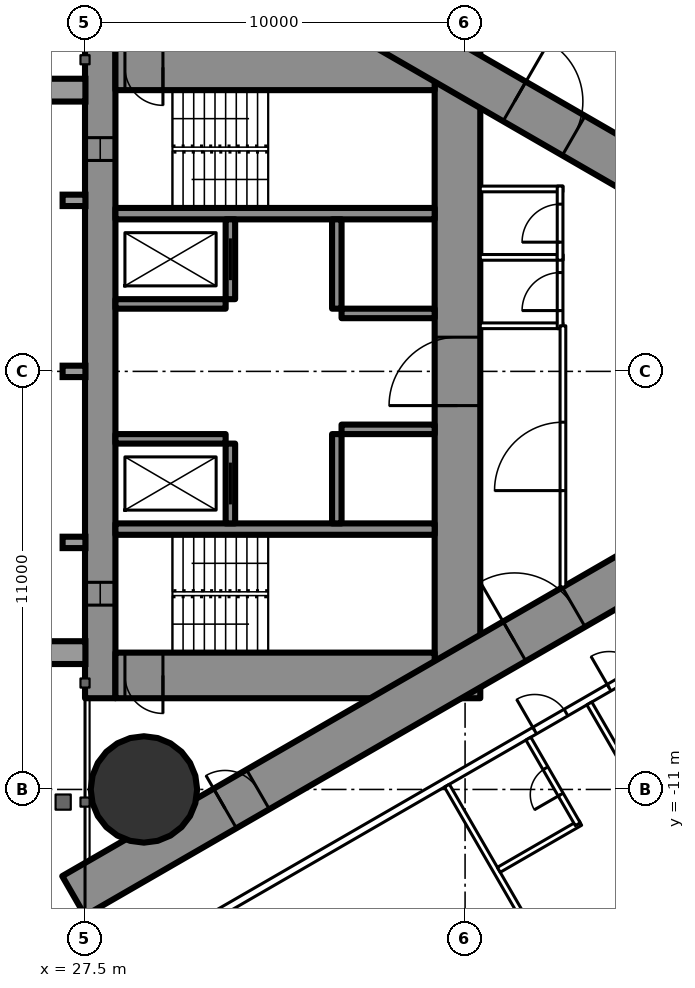
"""IFC4 building model, lengths in metres.
Left out: names, types, materials, properties, quantities, classifications, styles, units other than length and angle.
Written with IfcOpenShell. Run it as: python <this file> out.ifc"""

import sys

from ifc_helpers import new_model, si_unit, direction, frame, frame_2d, origin, origin_2d, place, context, subcontext, project, spatial, rectangle, circle, extrude, element, fill, save


model = new_model("IFC4")
c1 = context("Model", 3, precision=1e-05, world=origin(), true_north=direction((0.0, 1.0)))
c2 = subcontext(c1, "Body", "Model", "MODEL_VIEW")
j1 = project(units=[si_unit("LENGTHUNIT", "METRE"), si_unit("PLANEANGLEUNIT", "RADIAN")], contexts=[c1])
p1 = place(None, origin())
s1 = spatial("IfcSite", under=j1, at=p1, CompositionType="ELEMENT")
p2 = place(p1, origin())
s2 = spatial("IfcBuilding", under=s1, at=p2, CompositionType="ELEMENT")
p3 = place(p2, frame((0.0, 0.0, 191.3)))
s3 = spatial("IfcBuildingStorey", under=s2, at=p3, CompositionType="ELEMENT", Elevation=191.3)
p4 = place(p3, frame((29.05, -11.0, 0.0), z_axis=(0.0, 0.0, 1.0), x_axis=(1.0, 0.0, 0.0)))
e1 = element("IfcColumn", 1, at=p4, inside=s3, PredefinedType="COLUMN", context=c2, shape_type="SweptSolid", body=[
    extrude(circle(Radius=1.4, at=origin_2d()), origin(), (0.0, 0.0, 1.0), 3.5),
])
p5 = place(p3, frame((27.9, -8.6, 0.0), z_axis=(0.0, 0.0, 1.0), x_axis=(0.0, 1.0, 0.0)))
e2 = element("IfcWall", 2, at=p5, inside=s3, PredefinedType="SHEAR", context=c2, shape_type="SweptSolid", body=[
    extrude(rectangle(XDim=17.2, YDim=0.8, at=frame_2d((8.6, 0.0))), origin(), (0.0, 0.0, 1.0), 3.5),
])
p6 = place(p5, frame((2.45, 0.0, 0.6)))
e3 = element("IfcOpeningElement", 3, at=p6, cuts=e2, PredefinedType="OPENING", context=c2, shape_type="SweptSolid", body=[
    extrude(rectangle(XDim=0.6, YDim=2.1, at=frame_2d((0.3, 1.05))), frame((0.0, 0.41, 0.0), z_axis=(0.0, -1.0, 0.0), x_axis=(1.0, 0.0, 0.0)), (0.0, 0.0, 1.0), 0.82),
])
p7 = place(p5, frame((14.15, 0.0, 0.6)))
e4 = element("IfcOpeningElement", 4, at=p7, cuts=e2, PredefinedType="OPENING", context=c2, shape_type="SweptSolid", body=[
    extrude(rectangle(XDim=0.6, YDim=2.1, at=frame_2d((0.3, 1.05))), frame((0.0, 0.41, 0.0), z_axis=(0.0, -1.0, 0.0), x_axis=(1.0, 0.0, 0.0)), (0.0, 0.0, 1.0), 0.82),
])
p8 = place(p3, frame((37.3, -8.6, 0.0), z_axis=(0.0, 0.0, 1.0), x_axis=(0.0, 1.0, 0.0)))
e5 = element("IfcWall", 5, at=p8, inside=s3, PredefinedType="SHEAR", context=c2, shape_type="SweptSolid", body=[
    extrude(rectangle(XDim=17.2, YDim=1.2, at=frame_2d((8.6, 0.0))), origin(), (0.0, 0.0, 1.0), 3.5),
])
p9 = place(p8, frame((7.7, 0.0, 0.0)))
e6 = element("IfcOpeningElement", 6, at=p9, cuts=e5, PredefinedType="OPENING", context=c2, shape_type="SweptSolid", body=[
    extrude(rectangle(XDim=1.8, YDim=2.2, at=frame_2d((0.9, 1.1))), frame((0.0, 0.61, 0.0), z_axis=(0.0, -1.0, 0.0), x_axis=(1.0, 0.0, 0.0)), (0.0, 0.0, 1.0), 1.22),
])
p10 = place(p3, frame((28.3, -8.0, 0.0), z_axis=(0.0, 0.0, 1.0), x_axis=(1.0, 0.0, 0.0)))
e7 = element("IfcWall", 7, at=p10, inside=s3, PredefinedType="SHEAR", context=c2, shape_type="SweptSolid", body=[
    extrude(rectangle(XDim=8.4, YDim=1.2, at=frame_2d((4.2, 0.0))), origin(), (0.0, 0.0, 1.0), 3.5),
])
p11 = place(p10, frame((0.25, 0.0, 0.0)))
e8 = element("IfcOpeningElement", 8, at=p11, cuts=e7, PredefinedType="OPENING", context=c2, shape_type="SweptSolid", body=[
    extrude(rectangle(XDim=1.0, YDim=2.2, at=frame_2d((0.5, 1.1))), frame((0.0, 0.61, 0.0), z_axis=(0.0, -1.0, 0.0), x_axis=(1.0, 0.0, 0.0)), (0.0, 0.0, 1.0), 1.22),
])
p12 = place(p3, frame((28.3, 8.0, 0.0), z_axis=(0.0, 0.0, 1.0), x_axis=(1.0, 0.0, 0.0)))
e9 = element("IfcWall", 9, at=p12, inside=s3, PredefinedType="SHEAR", context=c2, shape_type="SweptSolid", body=[
    extrude(rectangle(XDim=8.4, YDim=1.2, at=frame_2d((4.2, 0.0))), origin(), (0.0, 0.0, 1.0), 3.5),
])
p13 = place(p12, frame((0.25, 0.0, 0.0)))
e10 = element("IfcOpeningElement", 10, at=p13, cuts=e9, PredefinedType="OPENING", context=c2, shape_type="SweptSolid", body=[
    extrude(rectangle(XDim=1.0, YDim=2.2, at=frame_2d((0.5, 1.1))), frame((0.0, 0.61, 0.0), z_axis=(0.0, -1.0, 0.0), x_axis=(1.0, 0.0, 0.0)), (0.0, 0.0, 1.0), 1.22),
])
for number, where, z_axis, x_axis in (
    (11, (28.3, -4.15, 0.0), (0.0, 0.0, 1.0), (1.0, 0.0, 0.0)),
    (12, (28.3, 4.15, 0.0), (0.0, 0.0, 1.0), (1.0, 0.0, 0.0)),
):
    element("IfcWall", number, at=place(p3, frame(where, z_axis=z_axis, x_axis=x_axis)), inside=s3, PredefinedType="SHEAR", context=c2, shape_type="SweptSolid", body=[
        extrude(rectangle(XDim=8.4, YDim=0.3, at=frame_2d((4.2, 0.0))), origin(), (0.0, 0.0, 1.0), 3.5),
    ])
p14 = place(p3, frame((31.325, -4.0, 0.0), z_axis=(0.0, 0.0, 1.0), x_axis=(0.0, 1.0, 0.0)))
e13 = element("IfcWall", 13, at=p14, inside=s3, PredefinedType="SHEAR", context=c2, shape_type="SweptSolid", body=[
    extrude(rectangle(XDim=2.1, YDim=0.25, at=frame_2d((1.05, 0.0))), origin(), (0.0, 0.0, 1.0), 3.5),
])
p15 = place(p14, frame((0.5, 0.0, 0.0)))
e14 = element("IfcOpeningElement", 14, at=p15, cuts=e13, PredefinedType="OPENING", context=c2, shape_type="SweptSolid", body=[
    extrude(rectangle(XDim=1.1, YDim=2.2, at=frame_2d((0.55, 1.1))), frame((0.0, 0.135, 0.0), z_axis=(0.0, -1.0, 0.0), x_axis=(1.0, 0.0, 0.0)), (0.0, 0.0, 1.0), 0.27),
])
p16 = place(p3, frame((34.125, -4.0, 0.0), z_axis=(0.0, 0.0, 1.0), x_axis=(0.0, 1.0, 0.0)))
e15 = element("IfcWall", 15, at=p16, inside=s3, PredefinedType="SHEAR", context=c2, shape_type="SweptSolid", body=[
    extrude(rectangle(XDim=2.35, YDim=0.25, at=frame_2d((1.175, 0.0))), origin(), (0.0, 0.0, 1.0), 3.5),
])
p17 = place(p3, frame((28.3, -1.775, 0.0), z_axis=(0.0, 0.0, 1.0), x_axis=(1.0, 0.0, 0.0)))
e16 = element("IfcWall", 16, at=p17, inside=s3, PredefinedType="SHEAR", context=c2, shape_type="SweptSolid", body=[
    extrude(rectangle(XDim=2.9, YDim=0.25, at=frame_2d((1.45, 0.0))), origin(), (0.0, 0.0, 1.0), 3.5),
])
p18 = place(p3, frame((34.25, -1.525, 0.0), z_axis=(0.0, 0.0, 1.0), x_axis=(1.0, 0.0, 0.0)))
e17 = element("IfcWall", 17, at=p18, inside=s3, PredefinedType="SHEAR", context=c2, shape_type="SweptSolid", body=[
    extrude(rectangle(XDim=2.45, YDim=0.25, at=frame_2d((1.225, 0.0))), origin(), (0.0, 0.0, 1.0), 3.5),
])
p19 = place(p3, frame((31.325, 1.9, 0.0), z_axis=(0.0, 0.0, 1.0), x_axis=(0.0, 1.0, 0.0)))
e18 = element("IfcWall", 18, at=p19, inside=s3, PredefinedType="SHEAR", context=c2, shape_type="SweptSolid", body=[
    extrude(rectangle(XDim=2.1, YDim=0.25, at=frame_2d((1.05, 0.0))), origin(), (0.0, 0.0, 1.0), 3.5),
])
p20 = place(p19, frame((0.5, 0.0, 0.0)))
e19 = element("IfcOpeningElement", 19, at=p20, cuts=e18, PredefinedType="OPENING", context=c2, shape_type="SweptSolid", body=[
    extrude(rectangle(XDim=1.1, YDim=2.2, at=frame_2d((0.55, 1.1))), frame((0.0, 0.135, 0.0), z_axis=(0.0, -1.0, 0.0), x_axis=(1.0, 0.0, 0.0)), (0.0, 0.0, 1.0), 0.27),
])
p21 = place(p3, frame((34.125, 1.65, 0.0), z_axis=(0.0, 0.0, 1.0), x_axis=(0.0, 1.0, 0.0)))
e20 = element("IfcWall", 20, at=p21, inside=s3, PredefinedType="SHEAR", context=c2, shape_type="SweptSolid", body=[
    extrude(rectangle(XDim=2.35, YDim=0.25, at=frame_2d((1.175, 0.0))), origin(), (0.0, 0.0, 1.0), 3.5),
])
p22 = place(p3, frame((28.3, 1.775, 0.0), z_axis=(0.0, 0.0, 1.0), x_axis=(1.0, 0.0, 0.0)))
e21 = element("IfcWall", 21, at=p22, inside=s3, PredefinedType="SHEAR", context=c2, shape_type="SweptSolid", body=[
    extrude(rectangle(XDim=2.9, YDim=0.25, at=frame_2d((1.45, 0.0))), origin(), (0.0, 0.0, 1.0), 3.5),
])
p23 = place(p3, frame((34.25, 1.525, 0.0), z_axis=(0.0, 0.0, 1.0), x_axis=(1.0, 0.0, 0.0)))
e22 = element("IfcWall", 22, at=p23, inside=s3, PredefinedType="SHEAR", context=c2, shape_type="SweptSolid", body=[
    extrude(rectangle(XDim=2.45, YDim=0.25, at=frame_2d((1.225, 0.0))), origin(), (0.0, 0.0, 1.0), 3.5),
])
p24 = place(p3, frame((27.2, -13.8, 0.0), z_axis=(0.0, 0.0, 1.0), x_axis=(0.866027159892, 0.499996958321, 0.0)))
e23 = element("IfcWall", 23, at=p24, inside=s3, PredefinedType="SHEAR", context=c2, shape_type="SweptSolid", body=[
    extrude(rectangle(XDim=27.947, YDim=1.2, at=frame_2d((13.973, 0.0))), origin(), (0.0, 0.0, 1.0), 3.5),
])
p25 = place(p24, frame((4.6, 0.0, 0.0)))
e24 = element("IfcOpeningElement", 24, at=p25, cuts=e23, PredefinedType="OPENING", context=c2, shape_type="SweptSolid", body=[
    extrude(rectangle(XDim=1.0, YDim=2.2, at=frame_2d((0.5, 1.1))), frame((0.0, 0.61, 0.0), z_axis=(0.0, -1.0, 0.0), x_axis=(1.0, 0.0, 0.0)), (0.0, 0.0, 1.0), 1.22),
])
p26 = place(p24, frame((13.395, 0.0, 0.0)))
e25 = element("IfcOpeningElement", 25, at=p26, cuts=e23, PredefinedType="OPENING", context=c2, shape_type="SweptSolid", body=[
    extrude(rectangle(XDim=1.8, YDim=2.2, at=frame_2d((0.9, 1.1))), frame((0.0, 0.61, 0.0), z_axis=(0.0, -1.0, 0.0), x_axis=(1.0, 0.0, 0.0)), (0.0, 0.0, 1.0), 1.22),
])
p27 = place(p3, frame((27.2, 13.8, 0.0), z_axis=(0.0, 0.0, 1.0), x_axis=(0.866024515034, -0.500001539357, 0.0)))
e26 = element("IfcWall", 26, at=p27, inside=s3, PredefinedType="SHEAR", context=c2, shape_type="SweptSolid", body=[
    extrude(rectangle(XDim=26.907, YDim=1.2, at=frame_2d((13.454, 0.0))), origin(), (0.0, 0.0, 1.0), 3.5),
])
p28 = place(p27, frame((4.6, 0.0, 0.0)))
e27 = element("IfcOpeningElement", 27, at=p28, cuts=e26, PredefinedType="OPENING", context=c2, shape_type="SweptSolid", body=[
    extrude(rectangle(XDim=1.0, YDim=2.2, at=frame_2d((0.5, 1.1))), frame((0.0, 0.61, 0.0), z_axis=(0.0, -1.0, 0.0), x_axis=(1.0, 0.0, 0.0)), (0.0, 0.0, 1.0), 1.22),
])
p29 = place(p27, frame((13.395, 0.0, 0.0)))
e28 = element("IfcOpeningElement", 28, at=p29, cuts=e26, PredefinedType="OPENING", context=c2, shape_type="SweptSolid", body=[
    extrude(rectangle(XDim=1.8, YDim=2.2, at=frame_2d((0.9, 1.1))), frame((0.0, 0.61, 0.0), z_axis=(0.0, -1.0, 0.0), x_axis=(1.0, 0.0, 0.0)), (0.0, 0.0, 1.0), 1.22),
])
p30 = place(p3, frame((27.959, -16.017, 0.0), z_axis=(0.0, 0.0, 1.0), x_axis=(0.866024151371, 0.500002169237, 0.0)))
e29 = element("IfcWall", 29, at=p30, inside=s3, PredefinedType="PARTITIONING", context=c2, shape_type="SweptSolid", body=[
    extrude(rectangle(XDim=32.034, YDim=0.2, at=frame_2d((16.017, 0.0))), origin(), (0.0, 0.0, 1.0), 3.25),
])
p31 = place(p30, frame((0.6, 0.0, 0.0)))
e30 = element("IfcOpeningElement", 30, at=p31, cuts=e29, PredefinedType="OPENING", context=c2, shape_type="SweptSolid", body=[
    extrude(rectangle(XDim=0.95, YDim=2.2, at=frame_2d((0.475, 1.1))), frame((0.0, 0.11, 0.0), z_axis=(0.0, -1.0, 0.0), x_axis=(1.0, 0.0, 0.0)), (0.0, 0.0, 1.0), 0.22),
])
p32 = place(p30, frame((13.132, 0.0, 0.0)))
e31 = element("IfcOpeningElement", 31, at=p32, cuts=e29, PredefinedType="OPENING", context=c2, shape_type="SweptSolid", body=[
    extrude(rectangle(XDim=0.95, YDim=2.2, at=frame_2d((0.475, 1.1))), frame((0.0, 0.11, 0.0), z_axis=(0.0, -1.0, 0.0), x_axis=(1.0, 0.0, 0.0)), (0.0, 0.0, 1.0), 0.22),
])
p33 = place(p30, frame((15.391, 0.0, 0.0)))
e32 = element("IfcOpeningElement", 32, at=p33, cuts=e29, PredefinedType="OPENING", context=c2, shape_type="SweptSolid", body=[
    extrude(rectangle(XDim=0.95, YDim=2.2, at=frame_2d((0.475, 1.1))), frame((0.0, 0.11, 0.0), z_axis=(0.0, -1.0, 0.0), x_axis=(1.0, 0.0, 0.0)), (0.0, 0.0, 1.0), 0.22),
])
p34 = place(p30, frame((19.441, 0.0, 0.0)))
e33 = element("IfcOpeningElement", 33, at=p34, cuts=e29, PredefinedType="OPENING", context=c2, shape_type="SweptSolid", body=[
    extrude(rectangle(XDim=0.95, YDim=2.2, at=frame_2d((0.475, 1.1))), frame((0.0, 0.11, 0.0), z_axis=(0.0, -1.0, 0.0), x_axis=(1.0, 0.0, 0.0)), (0.0, 0.0, 1.0), 0.22),
])
p35 = place(p30, frame((26.406, 0.0, 0.0)))
e34 = element("IfcOpeningElement", 34, at=p35, cuts=e29, PredefinedType="OPENING", context=c2, shape_type="SweptSolid", body=[
    extrude(rectangle(XDim=0.95, YDim=2.2, at=frame_2d((0.475, 1.1))), frame((0.0, 0.11, 0.0), z_axis=(0.0, -1.0, 0.0), x_axis=(1.0, 0.0, 0.0)), (0.0, 0.0, 1.0), 0.22),
])
p36 = place(p30, frame((28.87, 0.0, 0.0)))
e35 = element("IfcOpeningElement", 35, at=p36, cuts=e29, PredefinedType="OPENING", context=c2, shape_type="SweptSolid", body=[
    extrude(rectangle(XDim=1.8, YDim=2.2, at=frame_2d((0.9, 1.1))), frame((0.0, 0.11, 0.0), z_axis=(0.0, -1.0, 0.0), x_axis=(1.0, 0.0, 0.0)), (0.0, 0.0, 1.0), 0.22),
])
p37 = place(p3, frame((37.022, -10.9, 0.0), z_axis=(0.0, 0.0, 1.0), x_axis=(0.499998620953, -0.866026199976, 0.0)))
e36 = element("IfcWall", 36, at=p37, inside=s3, PredefinedType="PARTITIONING", context=c2, shape_type="SweptSolid", body=[
    extrude(rectangle(XDim=9.77, YDim=0.15, at=frame_2d((4.885, 0.0))), origin(), (0.0, 0.0, 1.0), 3.25),
])
p38 = place(p3, frame((40.769, -8.737, 0.0), z_axis=(0.0, 0.0, 1.0), x_axis=(0.500013115284, -0.866017831539, 0.0)))
e37 = element("IfcWall", 37, at=p38, inside=s3, PredefinedType="PARTITIONING", context=c2, shape_type="SweptSolid", body=[
    extrude(rectangle(XDim=7.198, YDim=0.15, at=frame_2d((3.599, 0.0))), origin(), (0.0, 0.0, 1.0), 2.3),
])
p39 = place(p3, frame((38.387, -13.115, 0.0), z_axis=(0.0, 0.0, 1.0), x_axis=(0.866073894602, 0.499916002032, 0.0)))
e38 = element("IfcWall", 38, at=p39, inside=s3, PredefinedType="PARTITIONING", context=c2, shape_type="SweptSolid", body=[
    extrude(rectangle(XDim=2.475, YDim=0.15, at=frame_2d((1.238, 0.0))), origin(), (0.0, 0.0, 1.0), 3.25),
])
p40 = place(p3, frame((39.166, -9.663, 0.0), z_axis=(0.0, 0.0, 1.0), x_axis=(0.500006934395, -0.866021400173, 0.0)))
e39 = element("IfcWall", 39, at=p40, inside=s3, PredefinedType="PARTITIONING", context=c2, shape_type="SweptSolid", body=[
    extrude(rectangle(XDim=2.6, YDim=0.15, at=frame_2d((1.3, 0.0))), origin(), (0.0, 0.0, 1.0), 3.25),
])
p41 = place(p40, frame((0.9, 0.0, 0.0)))
e40 = element("IfcOpeningElement", 40, at=p41, cuts=e39, PredefinedType="OPENING", context=c2, shape_type="SweptSolid", body=[
    extrude(rectangle(XDim=0.8, YDim=2.2, at=frame_2d((0.4, 1.1))), frame((0.0, 0.085, 0.0), z_axis=(0.0, -1.0, 0.0), x_axis=(1.0, 0.0, 0.0)), (0.0, 0.0, 1.0), 0.17),
])
for number, where, z_axis, x_axis in (
    (41, (37.9, 1.2, 0.0), (0.0, 0.0, 1.0), (1.0, 0.0, 0.0)),
    (42, (37.9, 3.0, 0.0), (0.0, 0.0, 1.0), (1.0, 0.0, 0.0)),
    (43, (37.9, 4.8, 0.0), (0.0, 0.0, 1.0), (1.0, 0.0, 0.0)),
):
    element("IfcWall", number, at=place(p3, frame(where, z_axis=z_axis, x_axis=x_axis)), inside=s3, PredefinedType="PARTITIONING", context=c2, shape_type="SweptSolid", body=[
        extrude(rectangle(XDim=2.175, YDim=0.15, at=frame_2d((1.087, 0.0))), origin(), (0.0, 0.0, 1.0), 3.25),
    ])
p42 = place(p3, frame((40.0, 1.125, 0.0), z_axis=(0.0, 0.0, 1.0), x_axis=(0.0, 1.0, 0.0)))
e44 = element("IfcWall", 44, at=p42, inside=s3, PredefinedType="PARTITIONING", context=c2, shape_type="SweptSolid", body=[
    extrude(rectangle(XDim=1.95, YDim=0.15, at=frame_2d((0.975, 0.0))), origin(), (0.0, 0.0, 1.0), 3.25),
])
p43 = place(p42, frame((0.475, 0.0, 0.0)))
e45 = element("IfcOpeningElement", 45, at=p43, cuts=e44, PredefinedType="OPENING", context=c2, shape_type="SweptSolid", body=[
    extrude(rectangle(XDim=1.0, YDim=2.2, at=frame_2d((0.5, 1.1))), frame((0.0, 0.085, 0.0), z_axis=(0.0, -1.0, 0.0), x_axis=(1.0, 0.0, 0.0)), (0.0, 0.0, 1.0), 0.17),
])
p44 = place(p3, frame((40.0, 2.925, 0.0), z_axis=(0.0, 0.0, 1.0), x_axis=(0.0, 1.0, 0.0)))
e46 = element("IfcWall", 46, at=p44, inside=s3, PredefinedType="PARTITIONING", context=c2, shape_type="SweptSolid", body=[
    extrude(rectangle(XDim=1.95, YDim=0.15, at=frame_2d((0.975, 0.0))), origin(), (0.0, 0.0, 1.0), 3.25),
])
p45 = place(p44, frame((0.475, 0.0, 0.0)))
e47 = element("IfcOpeningElement", 47, at=p45, cuts=e46, PredefinedType="OPENING", context=c2, shape_type="SweptSolid", body=[
    extrude(rectangle(XDim=1.0, YDim=2.2, at=frame_2d((0.5, 1.1))), frame((0.0, 0.085, 0.0), z_axis=(0.0, -1.0, 0.0), x_axis=(1.0, 0.0, 0.0)), (0.0, 0.0, 1.0), 0.17),
])
p46 = place(p3, frame((40.075, -5.674, 0.0), z_axis=(0.0, 0.0, 1.0), x_axis=(0.0, 1.0, 0.0)))
e48 = element("IfcWall", 48, at=p46, inside=s3, PredefinedType="PARTITIONING", context=c2, shape_type="SweptSolid", body=[
    extrude(rectangle(XDim=6.874, YDim=0.15, at=frame_2d((3.437, 0.0))), origin(), (0.0, 0.0, 1.0), 3.25),
])
p47 = place(p46, frame((2.537, 0.0, 0.0)))
e49 = element("IfcOpeningElement", 49, at=p47, cuts=e48, PredefinedType="OPENING", context=c2, shape_type="SweptSolid", body=[
    extrude(rectangle(XDim=1.8, YDim=2.2, at=frame_2d((0.9, 1.1))), frame((0.0, 0.085, 0.0), z_axis=(0.0, -1.0, 0.0), x_axis=(1.0, 0.0, 0.0)), (0.0, 0.0, 1.0), 0.17),
])
p48 = place(p41, origin())
e50 = element("IfcDoor", 50, at=p48, inside=s3, OperationType="SINGLE_SWING_RIGHT", PredefinedType="DOOR", context=c2, shape_type="SweptSolid", body=[
    extrude(rectangle(XDim=0.8, YDim=2.2, at=frame_2d((0.4, 1.1))), frame((0.0, 0.025, 0.0), z_axis=(0.0, -1.0, 0.0), x_axis=(1.0, 0.0, 0.0)), (0.0, 0.0, 1.0), 0.05),
])
fill(e40, e50)
p49 = place(p32, origin())
e51 = element("IfcDoor", 51, at=p49, inside=s3, OperationType="SINGLE_SWING_LEFT", PredefinedType="DOOR", context=c2, shape_type="SweptSolid", body=[
    extrude(rectangle(XDim=0.95, YDim=2.2, at=frame_2d((0.475, 1.1))), frame((0.0, 0.025, 0.0), z_axis=(0.0, -1.0, 0.0), x_axis=(1.0, 0.0, 0.0)), (0.0, 0.0, 1.0), 0.05),
])
fill(e31, e51)
p50 = place(p33, origin())
e52 = element("IfcDoor", 52, at=p50, inside=s3, OperationType="SINGLE_SWING_LEFT", PredefinedType="DOOR", context=c2, shape_type="SweptSolid", body=[
    extrude(rectangle(XDim=0.95, YDim=2.2, at=frame_2d((0.475, 1.1))), frame((0.0, 0.025, 0.0), z_axis=(0.0, -1.0, 0.0), x_axis=(1.0, 0.0, 0.0)), (0.0, 0.0, 1.0), 0.05),
])
fill(e32, e52)
p51 = place(p43, origin())
e53 = element("IfcDoor", 53, at=p51, inside=s3, OperationType="SINGLE_SWING_LEFT", PredefinedType="DOOR", context=c2, shape_type="SweptSolid", body=[
    extrude(rectangle(XDim=1.0, YDim=2.2, at=frame_2d((0.5, 1.1))), frame((0.0, 0.025, 0.0), z_axis=(0.0, -1.0, 0.0), x_axis=(1.0, 0.0, 0.0)), (0.0, 0.0, 1.0), 0.05),
])
fill(e45, e53)
p52 = place(p45, origin())
e54 = element("IfcDoor", 54, at=p52, inside=s3, OperationType="SINGLE_SWING_LEFT", PredefinedType="DOOR", context=c2, shape_type="SweptSolid", body=[
    extrude(rectangle(XDim=1.0, YDim=2.2, at=frame_2d((0.5, 1.1))), frame((0.0, 0.025, 0.0), z_axis=(0.0, -1.0, 0.0), x_axis=(1.0, 0.0, 0.0)), (0.0, 0.0, 1.0), 0.05),
])
fill(e47, e54)
p53 = place(p47, origin())
e55 = element("IfcDoor", 55, at=p53, inside=s3, OperationType="DOUBLE_DOOR_SINGLE_SWING", PredefinedType="DOOR", context=c2, shape_type="SweptSolid", body=[
    extrude(rectangle(XDim=1.8, YDim=2.2, at=frame_2d((0.9, 1.1))), frame((0.0, 0.025, 0.0), z_axis=(0.0, -1.0, 0.0), x_axis=(1.0, 0.0, 0.0)), (0.0, 0.0, 1.0), 0.05),
])
fill(e49, e55)
p54 = place(p25, origin())
e56 = element("IfcDoor", 56, at=p54, inside=s3, OperationType="SINGLE_SWING_LEFT", PredefinedType="DOOR", context=c2, shape_type="SweptSolid", body=[
    extrude(rectangle(XDim=1.0, YDim=2.2, at=frame_2d((0.5, 1.1))), frame((0.0, 0.025, 0.0), z_axis=(0.0, -1.0, 0.0), x_axis=(1.0, 0.0, 0.0)), (0.0, 0.0, 1.0), 0.05),
])
fill(e24, e56)
p55 = place(p26, origin())
e57 = element("IfcDoor", 57, at=p55, inside=s3, OperationType="DOUBLE_DOOR_SINGLE_SWING", PredefinedType="DOOR", context=c2, shape_type="SweptSolid", body=[
    extrude(rectangle(XDim=1.8, YDim=2.2, at=frame_2d((0.9, 1.1))), frame((0.0, 0.025, 0.0), z_axis=(0.0, -1.0, 0.0), x_axis=(1.0, 0.0, 0.0)), (0.0, 0.0, 1.0), 0.05),
])
fill(e25, e57)
p56 = place(p29, origin())
e58 = element("IfcDoor", 58, at=p56, inside=s3, OperationType="DOUBLE_DOOR_SINGLE_SWING", PredefinedType="DOOR", context=c2, shape_type="SweptSolid", body=[
    extrude(rectangle(XDim=1.8, YDim=2.2, at=frame_2d((0.9, 1.1))), frame((0.0, 0.025, 0.0), z_axis=(0.0, -1.0, 0.0), x_axis=(1.0, 0.0, 0.0)), (0.0, 0.0, 1.0), 0.05),
])
fill(e28, e58)
p57 = place(p9, origin())
e59 = element("IfcDoor", 59, at=p57, inside=s3, OperationType="DOUBLE_DOOR_SINGLE_SWING", PredefinedType="DOOR", context=c2, shape_type="SweptSolid", body=[
    extrude(rectangle(XDim=1.8, YDim=2.2, at=frame_2d((0.9, 1.1))), frame((0.0, 0.025, 0.0), z_axis=(0.0, -1.0, 0.0), x_axis=(1.0, 0.0, 0.0)), (0.0, 0.0, 1.0), 0.05),
])
fill(e6, e59)
p58 = place(p11, origin())
e60 = element("IfcDoor", 60, at=p58, inside=s3, OperationType="SINGLE_SWING_RIGHT", PredefinedType="DOOR", context=c2, shape_type="SweptSolid", body=[
    extrude(rectangle(XDim=1.0, YDim=2.2, at=frame_2d((0.5, 1.1))), frame((0.0, 0.025, 0.0), z_axis=(0.0, -1.0, 0.0), x_axis=(1.0, 0.0, 0.0)), (0.0, 0.0, 1.0), 0.05),
])
fill(e8, e60)
p59 = place(p13, origin())
e61 = element("IfcDoor", 61, at=p59, inside=s3, OperationType="SINGLE_SWING_RIGHT", PredefinedType="DOOR", context=c2, shape_type="SweptSolid", body=[
    extrude(rectangle(XDim=1.0, YDim=2.2, at=frame_2d((0.5, 1.1))), frame((0.0, 0.025, 0.0), z_axis=(0.0, -1.0, 0.0), x_axis=(1.0, 0.0, 0.0)), (0.0, 0.0, 1.0), 0.05),
])
fill(e10, e61)
p60 = place(p15, origin())
e62 = element("IfcDoor", 62, at=p60, inside=s3, OperationType="SLIDING_TO_LEFT", PredefinedType="USERDEFINED", context=c2, shape_type="SweptSolid", body=[
    extrude(rectangle(XDim=1.1, YDim=2.2, at=frame_2d((0.55, 1.1))), frame((0.0, 0.025, 0.0), z_axis=(0.0, -1.0, 0.0), x_axis=(1.0, 0.0, 0.0)), (0.0, 0.0, 1.0), 0.05),
])
fill(e14, e62)
p61 = place(p20, origin())
e63 = element("IfcDoor", 63, at=p61, inside=s3, OperationType="SLIDING_TO_LEFT", PredefinedType="USERDEFINED", context=c2, shape_type="SweptSolid", body=[
    extrude(rectangle(XDim=1.1, YDim=2.2, at=frame_2d((0.55, 1.1))), frame((0.0, 0.025, 0.0), z_axis=(0.0, -1.0, 0.0), x_axis=(1.0, 0.0, 0.0)), (0.0, 0.0, 1.0), 0.05),
])
fill(e19, e63)
p62 = place(p6, origin())
e64 = element("IfcWindow", 64, at=p62, inside=s3, PartitioningType="SINGLE_PANEL", PredefinedType="WINDOW", context=c2, shape_type="SweptSolid", body=[
    extrude(rectangle(XDim=0.6, YDim=2.1, at=frame_2d((0.3, 1.05))), frame((0.0, 0.03, 0.0), z_axis=(0.0, -1.0, 0.0), x_axis=(1.0, 0.0, 0.0)), (0.0, 0.0, 1.0), 0.06),
])
fill(e3, e64)
p63 = place(p7, origin())
e65 = element("IfcWindow", 65, at=p63, inside=s3, PartitioningType="SINGLE_PANEL", PredefinedType="WINDOW", context=c2, shape_type="SweptSolid", body=[
    extrude(rectangle(XDim=0.6, YDim=2.1, at=frame_2d((0.3, 1.05))), frame((0.0, 0.03, 0.0), z_axis=(0.0, -1.0, 0.0), x_axis=(1.0, 0.0, 0.0)), (0.0, 0.0, 1.0), 0.06),
])
fill(e4, e65)
save(model, sys.argv[1])
